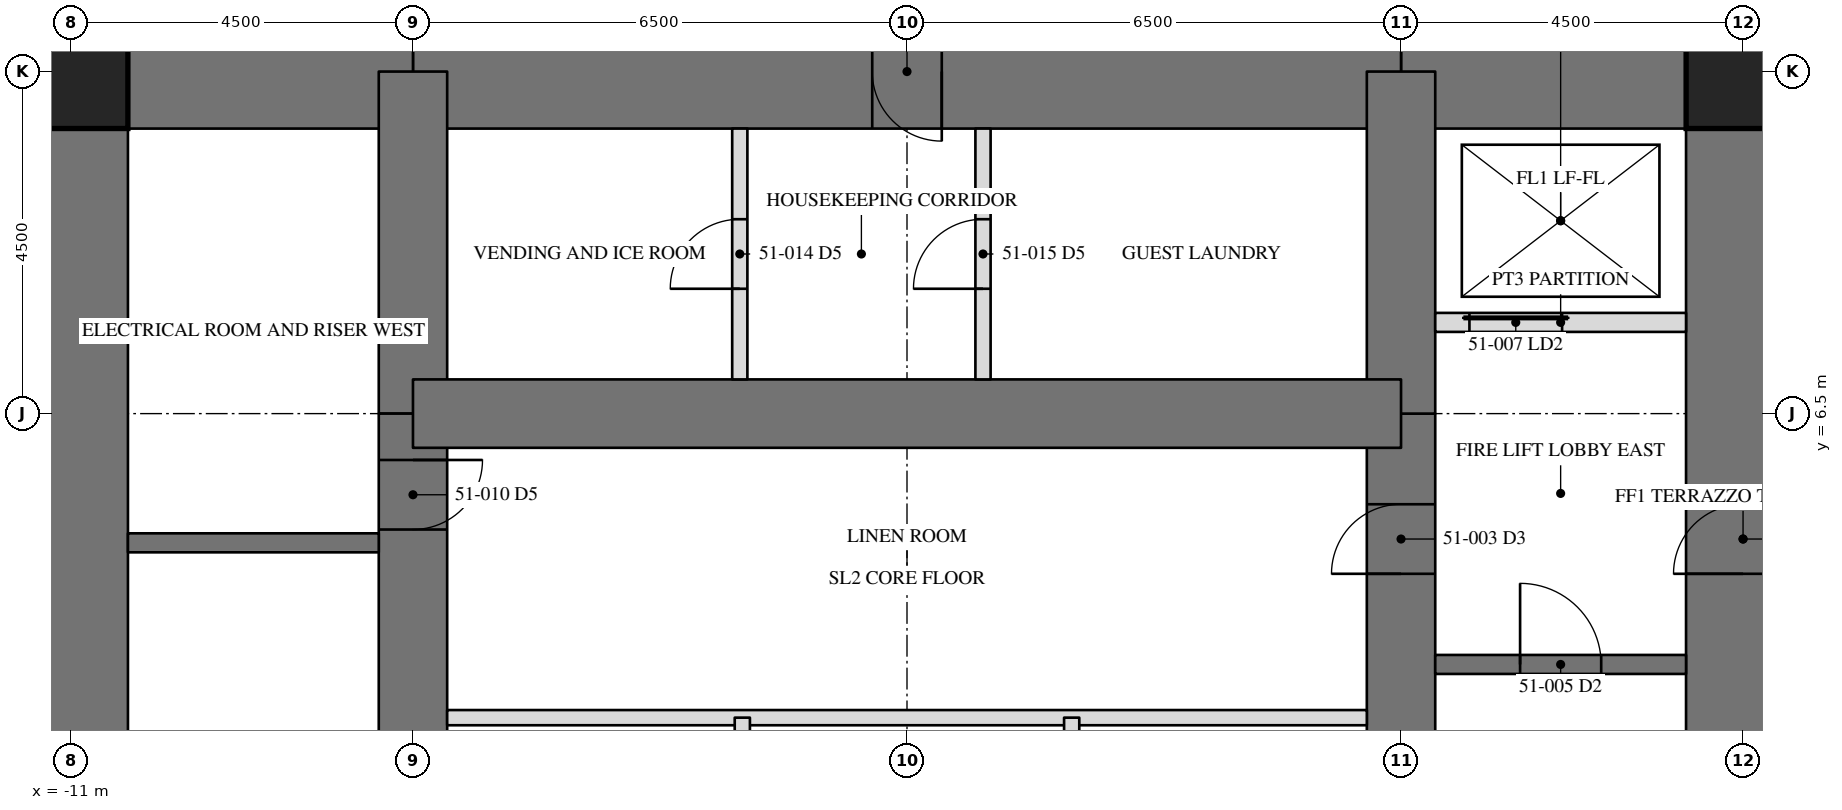
"""IFC4 building model, lengths in metres.
Left out: names, types, materials, properties, quantities, classifications, styles, units other than length and angle.
Written with IfcOpenShell. Run it as: python <this file> out.ifc"""

import sys

from ifc_helpers import new_model, si_unit, direction, frame, frame_2d, origin, origin_2d, place, context, subcontext, project, spatial, rectangle, hollow_rectangle, extrude, element, fill, save


model = new_model("IFC4")
c1 = context("Model", 3, precision=1e-05, world=origin(), true_north=direction((0.0, 1.0)))
c2 = subcontext(c1, "Body", "Model", "MODEL_VIEW")
j1 = project(units=[si_unit("LENGTHUNIT", "METRE"), si_unit("PLANEANGLEUNIT", "RADIAN")], contexts=[c1])
p1 = place(None, origin())
s1 = spatial("IfcSite", under=j1, at=p1, CompositionType="ELEMENT")
p2 = place(p1, origin())
s2 = spatial("IfcBuilding", under=s1, at=p2, CompositionType="ELEMENT")
p3 = place(p2, frame((0.0, 0.0, 215.2)))
s3 = spatial("IfcBuildingStorey", under=s2, at=p3, CompositionType="ELEMENT", Elevation=215.2)
p4 = place(p3, frame((11.0, -11.0, 0.0), z_axis=(0.0, 0.0, 1.0), x_axis=(0.0, 1.0, 0.0)))
e1 = element("IfcWall", 1, at=p4, inside=s3, PredefinedType="SHEAR", context=c2, shape_type="SweptSolid", body=[
    extrude(rectangle(XDim=22.0, YDim=1.5, at=frame_2d((11.0, 0.0))), origin(), (0.0, 0.0, 1.0), 3.5),
])
p5 = place(p4, frame((15.393, 0.0, 0.0)))
e2 = element("IfcOpeningElement", 2, at=p5, cuts=e1, PredefinedType="OPENING", context=c2, shape_type="SweptSolid", body=[
    extrude(rectangle(XDim=0.915, YDim=2.134, at=frame_2d((0.458, 1.067))), frame((0.0, 0.76, 0.0), z_axis=(0.0, -1.0, 0.0), x_axis=(1.0, 0.0, 0.0)), (0.0, 0.0, 1.0), 1.52),
])
p6 = place(p3, frame((-11.0, 11.0, 0.0), z_axis=(0.0, 0.0, 1.0), x_axis=(0.0, -1.0, 0.0)))
e3 = element("IfcWall", 3, at=p6, inside=s3, PredefinedType="SHEAR", context=c2, shape_type="SweptSolid", body=[
    extrude(rectangle(XDim=22.0, YDim=1.5, at=frame_2d((11.0, 0.0))), origin(), (0.0, 0.0, 1.0), 3.5),
])
p7 = place(p6, frame((15.393, 0.0, 0.0)))
e4 = element("IfcOpeningElement", 4, at=p7, cuts=e3, PredefinedType="OPENING", context=c2, shape_type="SweptSolid", body=[
    extrude(rectangle(XDim=0.915, YDim=2.134, at=frame_2d((0.458, 1.067))), frame((0.0, 0.76, 0.0), z_axis=(0.0, -1.0, 0.0), x_axis=(1.0, 0.0, 0.0)), (0.0, 0.0, 1.0), 1.52),
])
p8 = place(p3, frame((11.0, 11.0, 0.0), z_axis=(0.0, 0.0, 1.0), x_axis=(-1.0, 0.0, 0.0)))
e5 = element("IfcWall", 5, at=p8, inside=s3, PredefinedType="SHEAR", context=c2, shape_type="SweptSolid", body=[
    extrude(rectangle(XDim=4.5, YDim=1.5, at=frame_2d((2.25, 0.0))), origin(), (0.0, 0.0, 1.0), 3.5),
])
p9 = place(p3, frame((6.5, 11.0, 0.0), z_axis=(0.0, 0.0, 1.0), x_axis=(-1.0, 0.0, 0.0)))
e6 = element("IfcWall", 6, at=p9, inside=s3, PredefinedType="SHEAR", context=c2, shape_type="SweptSolid", body=[
    extrude(rectangle(XDim=13.0, YDim=1.5, at=frame_2d((6.5, 0.0))), origin(), (0.0, 0.0, 1.0), 3.5),
])
p10 = place(p9, frame((6.042, 0.0, 0.0)))
e7 = element("IfcOpeningElement", 7, at=p10, cuts=e6, PredefinedType="OPENING", context=c2, shape_type="SweptSolid", body=[
    extrude(rectangle(XDim=0.915, YDim=2.134, at=frame_2d((0.458, 1.067))), frame((0.0, 0.76, 0.0), z_axis=(0.0, -1.0, 0.0), x_axis=(1.0, 0.0, 0.0)), (0.0, 0.0, 1.0), 1.52),
])
p11 = place(p3, frame((-6.5, 11.0, 0.0), z_axis=(0.0, 0.0, 1.0), x_axis=(-1.0, 0.0, 0.0)))
e8 = element("IfcWall", 8, at=p11, inside=s3, PredefinedType="SHEAR", context=c2, shape_type="SweptSolid", body=[
    extrude(rectangle(XDim=4.5, YDim=1.5, at=frame_2d((2.25, 0.0))), origin(), (0.0, 0.0, 1.0), 3.5),
])
p12 = place(p3, frame((6.5, -6.5, 0.0), z_axis=(0.0, 0.0, 1.0), x_axis=(0.0, 1.0, 0.0)))
e9 = element("IfcWall", 9, at=p12, inside=s3, PredefinedType="SHEAR", context=c2, shape_type="SweptSolid", body=[
    extrude(rectangle(XDim=13.0, YDim=0.9, at=frame_2d((6.5, 0.0))), origin(), (0.0, 0.0, 1.0), 3.5),
])
p13 = place(p12, frame((10.893, 0.0, 0.0)))
e10 = element("IfcOpeningElement", 10, at=p13, cuts=e9, PredefinedType="OPENING", context=c2, shape_type="SweptSolid", body=[
    extrude(rectangle(XDim=0.915, YDim=2.134, at=frame_2d((0.458, 1.067))), frame((0.0, 0.46, 0.0), z_axis=(0.0, -1.0, 0.0), x_axis=(1.0, 0.0, 0.0)), (0.0, 0.0, 1.0), 0.92),
])
p14 = place(p12, frame((0.61, 0.0, 0.0)))
e11 = element("IfcOpeningElement", 11, at=p14, cuts=e9, PredefinedType="OPENING", context=c2, shape_type="SweptSolid", body=[
    extrude(rectangle(XDim=0.915, YDim=2.134, at=frame_2d((0.458, 1.067))), frame((0.0, 0.46, 0.0), z_axis=(0.0, -1.0, 0.0), x_axis=(1.0, 0.0, 0.0)), (0.0, 0.0, 1.0), 0.92),
])
for number, where, z_axis, x_axis in (
    (12, (6.5, 6.5, 0.0), (0.0, 0.0, 1.0), (0.0, 1.0, 0.0)),
    (13, (-6.5, 11.0, 0.0), (0.0, 0.0, 1.0), (0.0, -1.0, 0.0)),
):
    element("IfcWall", number, at=place(p3, frame(where, z_axis=z_axis, x_axis=x_axis)), inside=s3, PredefinedType="SHEAR", context=c2, shape_type="SweptSolid", body=[
        extrude(rectangle(XDim=4.5, YDim=0.9, at=frame_2d((2.25, 0.0))), origin(), (0.0, 0.0, 1.0), 3.5),
    ])
p15 = place(p3, frame((-6.5, 6.5, 0.0), z_axis=(0.0, 0.0, 1.0), x_axis=(0.0, -1.0, 0.0)))
e14 = element("IfcWall", 14, at=p15, inside=s3, PredefinedType="SHEAR", context=c2, shape_type="SweptSolid", body=[
    extrude(rectangle(XDim=13.0, YDim=0.9, at=frame_2d((6.5, 0.0))), origin(), (0.0, 0.0, 1.0), 3.5),
])
p16 = place(p15, frame((10.893, 0.0, 0.0)))
e15 = element("IfcOpeningElement", 15, at=p16, cuts=e14, PredefinedType="OPENING", context=c2, shape_type="SweptSolid", body=[
    extrude(rectangle(XDim=0.915, YDim=2.134, at=frame_2d((0.458, 1.067))), frame((0.0, 0.46, 0.0), z_axis=(0.0, -1.0, 0.0), x_axis=(1.0, 0.0, 0.0)), (0.0, 0.0, 1.0), 0.92),
])
p17 = place(p15, frame((0.61, 0.0, 0.0)))
e16 = element("IfcOpeningElement", 16, at=p17, cuts=e14, PredefinedType="OPENING", context=c2, shape_type="SweptSolid", body=[
    extrude(rectangle(XDim=0.915, YDim=2.134, at=frame_2d((0.458, 1.067))), frame((0.0, 0.46, 0.0), z_axis=(0.0, -1.0, 0.0), x_axis=(1.0, 0.0, 0.0)), (0.0, 0.0, 1.0), 0.92),
])
p18 = place(p3, frame((6.5, 6.5, 0.0), z_axis=(0.0, 0.0, 1.0), x_axis=(-1.0, 0.0, 0.0)))
e17 = element("IfcWall", 17, at=p18, inside=s3, PredefinedType="SHEAR", context=c2, shape_type="SweptSolid", body=[
    extrude(rectangle(XDim=13.0, YDim=0.9, at=frame_2d((6.5, 0.0))), origin(), (0.0, 0.0, 1.0), 3.5),
])
for number, where, z_axis, x_axis in (
    (18, (11.0, 11.0, 0.0), (0.0, 0.0, 1.0), (1.0, 0.0, 0.0)),
    (19, (-11.0, 11.0, 0.0), (0.0, 0.0, 1.0), (1.0, 0.0, 0.0)),
):
    element("IfcColumn", number, at=place(p3, frame(where, z_axis=z_axis, x_axis=x_axis)), inside=s3, PredefinedType="COLUMN", context=c2, shape_type="SweptSolid", body=[
        extrude(hollow_rectangle(XDim=1.499, YDim=1.499, WallThickness=0.102, at=origin_2d()), origin(), (0.0, 0.0, 1.0), 3.5),
    ])
p19 = place(p3, frame((-6.95, 4.8, 0.0), z_axis=(0.0, 0.0, 1.0), x_axis=(-1.0, 0.0, 0.0)))
e20 = element("IfcWall", 20, at=p19, inside=s3, PredefinedType="SOLIDWALL", context=c2, shape_type="SweptSolid", body=[
    extrude(rectangle(XDim=3.3, YDim=0.25, at=frame_2d((1.65, 0.0))), origin(), (0.0, 0.0, 1.0), 3.31),
])
p20 = place(p3, frame((6.95, 3.2, 0.0), z_axis=(0.0, 0.0, 1.0), x_axis=(1.0, 0.0, 0.0)))
e21 = element("IfcWall", 21, at=p20, inside=s3, PredefinedType="SOLIDWALL", context=c2, shape_type="SweptSolid", body=[
    extrude(rectangle(XDim=3.3, YDim=0.25, at=frame_2d((1.65, 0.0))), origin(), (0.0, 0.0, 1.0), 3.31),
])
p21 = place(p20, frame((1.116, 0.0, 0.0)))
e22 = element("IfcOpeningElement", 22, at=p21, cuts=e21, PredefinedType="OPENING", context=c2, shape_type="SweptSolid", body=[
    extrude(rectangle(XDim=1.067, YDim=2.134, at=frame_2d((0.533, 1.067))), frame((0.0, 0.135, 0.0), z_axis=(0.0, -1.0, 0.0), x_axis=(1.0, 0.0, 0.0)), (0.0, 0.0, 1.0), 0.27),
])
p22 = place(p3, frame((6.95, 7.7, 0.0), z_axis=(0.0, 0.0, 1.0), x_axis=(1.0, 0.0, 0.0)))
e23 = element("IfcWall", 23, at=p22, inside=s3, PredefinedType="PARTITIONING", context=c2, shape_type="SweptSolid", body=[
    extrude(rectangle(XDim=3.3, YDim=0.25, at=frame_2d((1.65, 0.0))), origin(), (0.0, 0.0, 1.0), 3.31),
])
p23 = place(p22, frame((0.45, 0.0, 0.0)))
e24 = element("IfcOpeningElement", 24, at=p23, cuts=e23, PredefinedType="OPENING", context=c2, shape_type="SweptSolid", body=[
    extrude(rectangle(XDim=1.219, YDim=2.134, at=frame_2d((0.609, 1.067))), frame((0.0, 0.135, 0.0), z_axis=(0.0, -1.0, 0.0), x_axis=(1.0, 0.0, 0.0)), (0.0, 0.0, 1.0), 0.27),
])
p24 = place(p3, frame((-6.05, 2.5, 0.0), z_axis=(0.0, 0.0, 1.0), x_axis=(1.0, 0.0, 0.0)))
e25 = element("IfcWall", 25, at=p24, inside=s3, PredefinedType="PARTITIONING", context=c2, shape_type="SweptSolid", body=[
    extrude(rectangle(XDim=12.1, YDim=0.2, at=frame_2d((6.05, 0.0))), origin(), (0.0, 0.0, 1.0), 3.31),
])
for number, where, z_axis, x_axis in (
    (26, (-2.167, -2.5, 0.0), (0.0, 0.0, 1.0), (0.0, 1.0, 0.0)),
    (27, (2.167, -2.5, 0.0), (0.0, 0.0, 1.0), (0.0, 1.0, 0.0)),
):
    element("IfcWall", number, at=place(p3, frame(where, z_axis=z_axis, x_axis=x_axis)), inside=s3, PredefinedType="PARTITIONING", context=c2, shape_type="SweptSolid", body=[
        extrude(rectangle(XDim=5.0, YDim=0.2, at=frame_2d((2.5, 0.0))), origin(), (0.0, 0.0, 1.0), 3.31),
    ])
p25 = place(p3, frame((-2.2, 6.95, 0.0), z_axis=(0.0, 0.0, 1.0), x_axis=(0.0, 1.0, 0.0)))
e28 = element("IfcWall", 28, at=p25, inside=s3, PredefinedType="PARTITIONING", context=c2, shape_type="SweptSolid", body=[
    extrude(rectangle(XDim=3.3, YDim=0.2, at=frame_2d((1.65, 0.0))), origin(), (0.0, 0.0, 1.0), 3.31),
])
p26 = place(p25, frame((1.192, 0.0, 0.0)))
e29 = element("IfcOpeningElement", 29, at=p26, cuts=e28, PredefinedType="OPENING", context=c2, shape_type="SweptSolid", body=[
    extrude(rectangle(XDim=0.915, YDim=2.134, at=frame_2d((0.458, 1.067))), frame((0.0, 0.11, 0.0), z_axis=(0.0, -1.0, 0.0), x_axis=(1.0, 0.0, 0.0)), (0.0, 0.0, 1.0), 0.22),
])
p27 = place(p3, frame((1.0, 6.95, 0.0), z_axis=(0.0, 0.0, 1.0), x_axis=(0.0, 1.0, 0.0)))
e30 = element("IfcWall", 30, at=p27, inside=s3, PredefinedType="PARTITIONING", context=c2, shape_type="SweptSolid", body=[
    extrude(rectangle(XDim=3.3, YDim=0.2, at=frame_2d((1.65, 0.0))), origin(), (0.0, 0.0, 1.0), 3.31),
])
p28 = place(p27, frame((1.192, 0.0, 0.0)))
e31 = element("IfcOpeningElement", 31, at=p28, cuts=e30, PredefinedType="OPENING", context=c2, shape_type="SweptSolid", body=[
    extrude(rectangle(XDim=0.915, YDim=2.134, at=frame_2d((0.458, 1.067))), frame((0.0, 0.11, 0.0), z_axis=(0.0, -1.0, 0.0), x_axis=(1.0, 0.0, 0.0)), (0.0, 0.0, 1.0), 0.22),
])
p29 = place(p13, origin())
e32 = element("IfcDoor", 32, at=p29, inside=s3, OperationType="SINGLE_SWING_RIGHT", PredefinedType="DOOR", context=c2, shape_type="SweptSolid", body=[
    extrude(rectangle(XDim=0.915, YDim=2.134, at=frame_2d((0.458, 1.067))), frame((0.0, -0.375, 0.0), z_axis=(0.0, -1.0, 0.0), x_axis=(1.0, 0.0, 0.0)), (0.0, 0.0, 1.0), 0.05),
])
fill(e10, e32)
p30 = place(p21, origin())
e33 = element("IfcDoor", 33, at=p30, inside=s3, OperationType="SINGLE_SWING_LEFT", PredefinedType="DOOR", context=c2, shape_type="SweptSolid", body=[
    extrude(rectangle(XDim=1.067, YDim=2.134, at=frame_2d((0.533, 1.067))), frame((0.0, 0.025, 0.0), z_axis=(0.0, -1.0, 0.0), x_axis=(1.0, 0.0, 0.0)), (0.0, 0.0, 1.0), 0.05),
])
fill(e22, e33)
p31 = place(p23, origin())
e34 = element("IfcDoor", 34, at=p31, inside=s3, OperationType="SLIDING_TO_LEFT", PredefinedType="DOOR", context=c2, shape_type="SweptSolid", body=[
    extrude(rectangle(XDim=1.219, YDim=2.134, at=frame_2d((0.609, 1.067))), frame((0.0, 0.025, 0.0), z_axis=(0.0, -1.0, 0.0), x_axis=(1.0, 0.0, 0.0)), (0.0, 0.0, 1.0), 0.05),
])
fill(e24, e34)
p32 = place(p17, origin())
e35 = element("IfcDoor", 35, at=p32, inside=s3, OperationType="SINGLE_SWING_RIGHT", PredefinedType="DOOR", context=c2, shape_type="SweptSolid", body=[
    extrude(rectangle(XDim=0.915, YDim=2.134, at=frame_2d((0.458, 1.067))), frame((0.0, -0.375, 0.0), z_axis=(0.0, -1.0, 0.0), x_axis=(1.0, 0.0, 0.0)), (0.0, 0.0, 1.0), 0.05),
])
fill(e16, e35)
p33 = place(p10, origin())
e36 = element("IfcDoor", 36, at=p33, inside=s3, OperationType="SINGLE_SWING_RIGHT", PredefinedType="DOOR", context=c2, shape_type="SweptSolid", body=[
    extrude(rectangle(XDim=0.915, YDim=2.134, at=frame_2d((0.458, 1.067))), frame((0.0, 0.025, 0.0), z_axis=(0.0, -1.0, 0.0), x_axis=(1.0, 0.0, 0.0)), (0.0, 0.0, 1.0), 0.05),
])
fill(e7, e36)
p34 = place(p26, origin())
e37 = element("IfcDoor", 37, at=p34, inside=s3, OperationType="SINGLE_SWING_RIGHT", PredefinedType="DOOR", context=c2, shape_type="SweptSolid", body=[
    extrude(rectangle(XDim=0.915, YDim=2.134, at=frame_2d((0.458, 1.067))), frame((0.0, 0.025, 0.0), z_axis=(0.0, -1.0, 0.0), x_axis=(1.0, 0.0, 0.0)), (0.0, 0.0, 1.0), 0.05),
])
fill(e29, e37)
p35 = place(p28, origin())
e38 = element("IfcDoor", 38, at=p35, inside=s3, OperationType="SINGLE_SWING_RIGHT", PredefinedType="DOOR", context=c2, shape_type="SweptSolid", body=[
    extrude(rectangle(XDim=0.915, YDim=2.134, at=frame_2d((0.458, 1.067))), frame((0.0, 0.025, 0.0), z_axis=(0.0, -1.0, 0.0), x_axis=(1.0, 0.0, 0.0)), (0.0, 0.0, 1.0), 0.05),
])
fill(e31, e38)
save(model, sys.argv[1])
